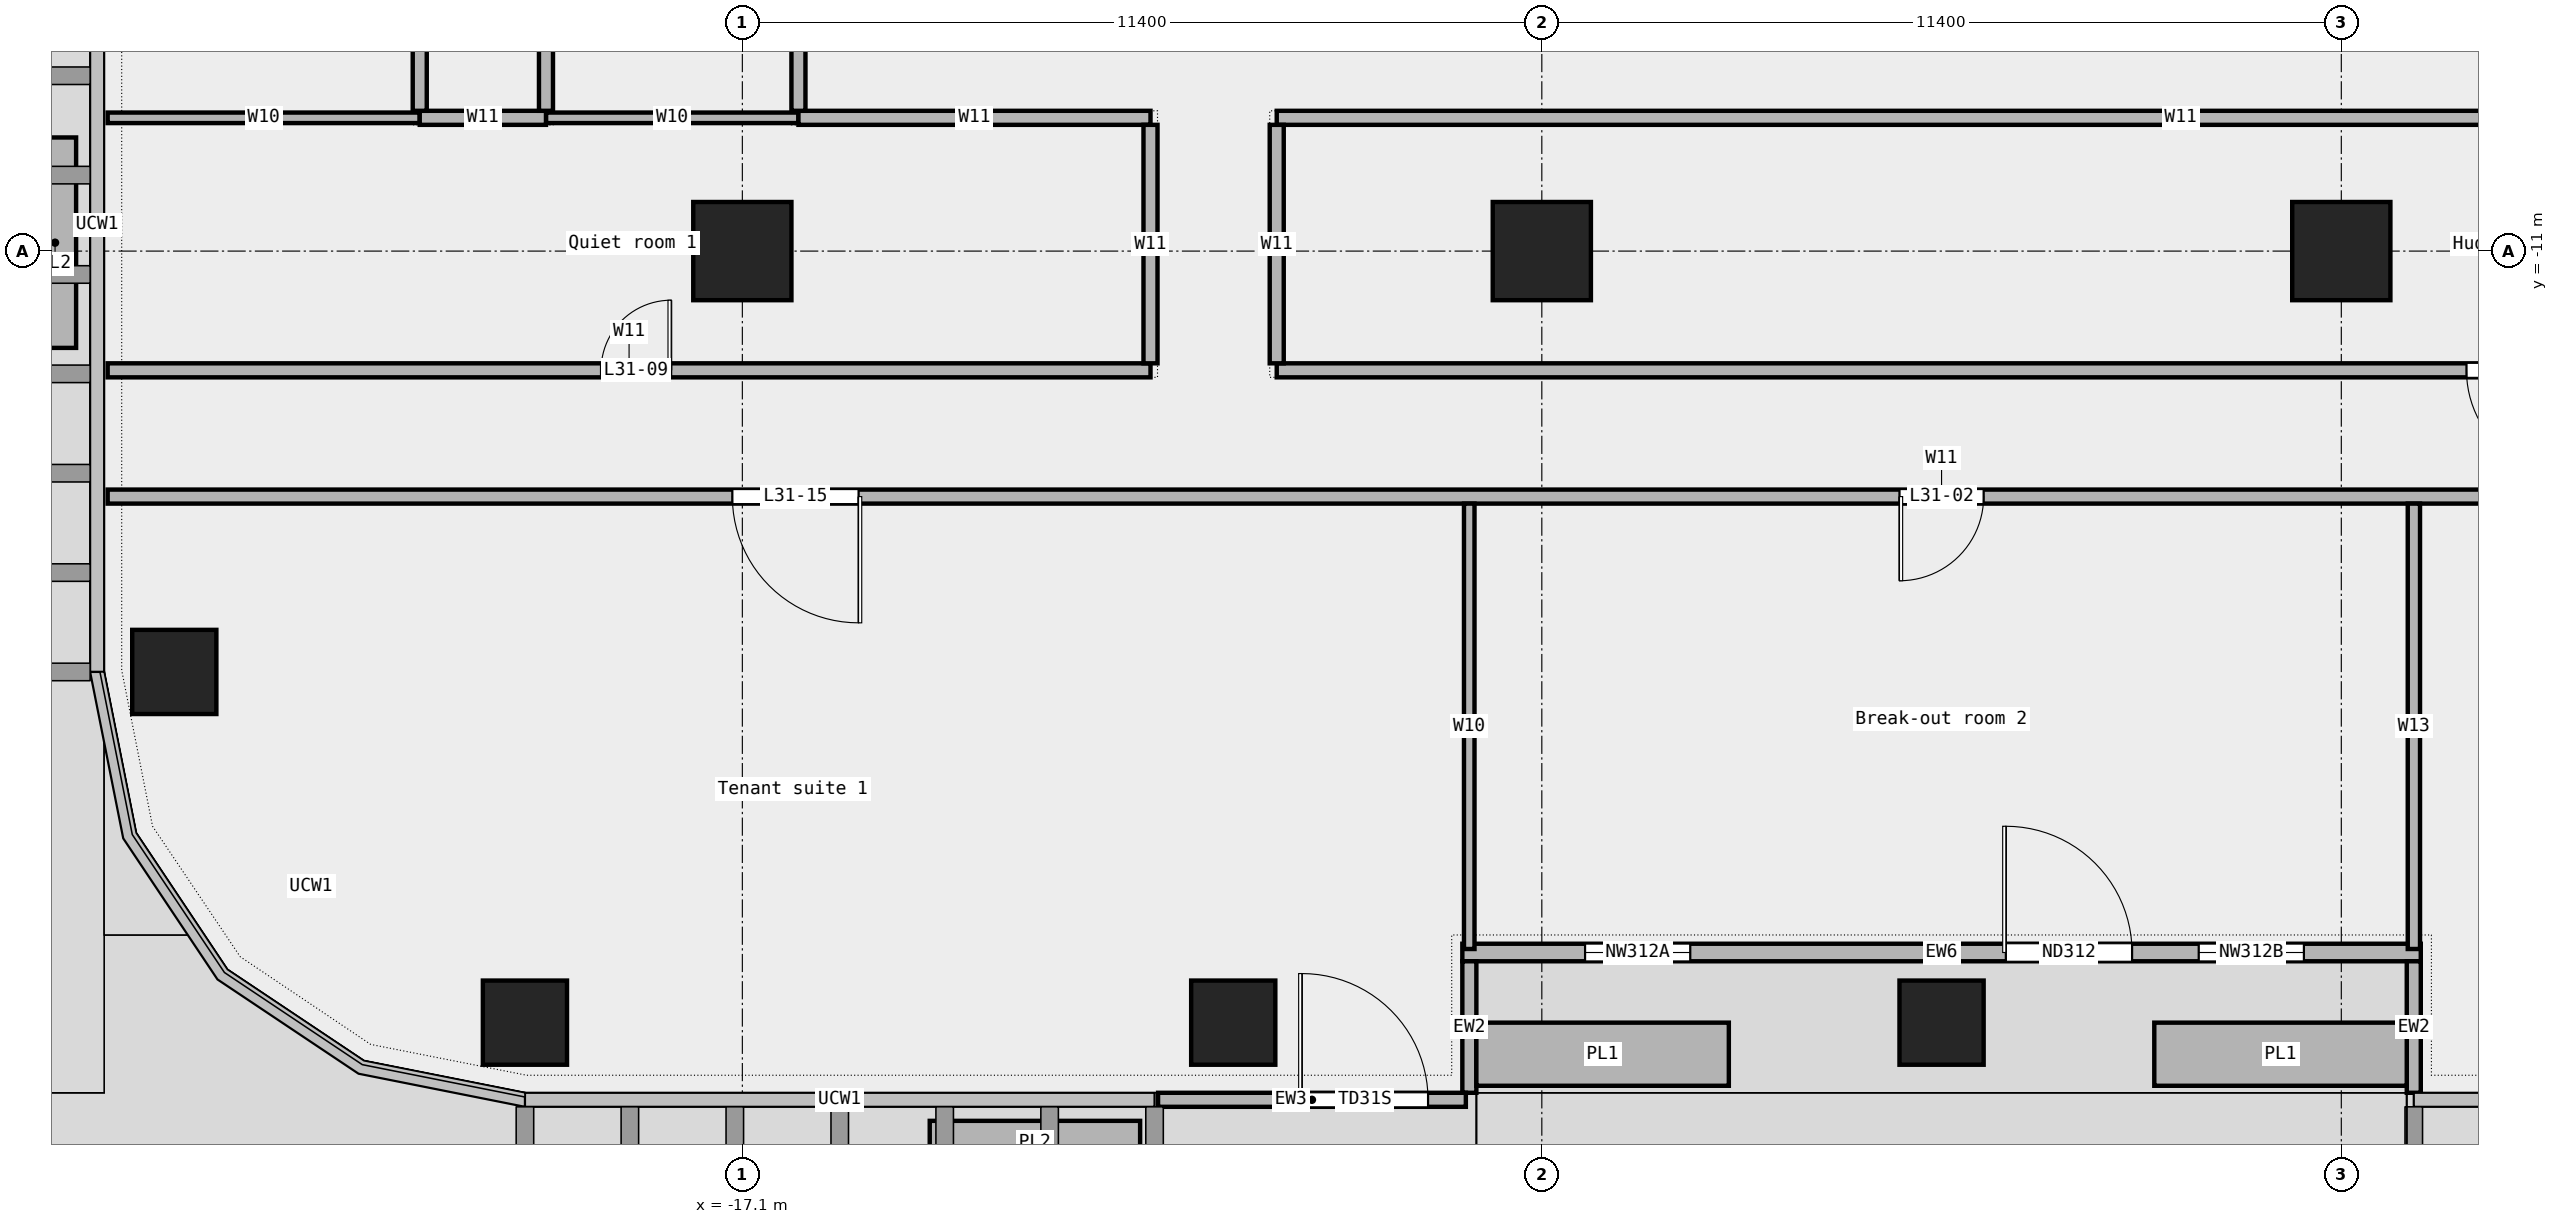
"""IFC4 building model, lengths in metres.
Left out: names, types, materials, properties, quantities, classifications, styles, units other than length and angle.
Written with IfcOpenShell. Run it as: python <this file> out.ifc"""

import sys

from ifc_helpers import new_model, si_unit, direction, frame, frame_2d, origin, origin_2d, place, context, subcontext, project, spatial, rectangle, extrude, element, fill, save


model = new_model("IFC4")
c1 = context("Model", 3, precision=1e-05, world=origin(), true_north=direction((0.0, 1.0)))
c2 = subcontext(c1, "Body", "Model", "MODEL_VIEW")
j1 = project(units=[si_unit("LENGTHUNIT", "METRE"), si_unit("PLANEANGLEUNIT", "RADIAN")], contexts=[c1])
p1 = place(None, origin())
s1 = spatial("IfcSite", under=j1, at=p1, CompositionType="ELEMENT")
p2 = place(p1, origin())
s2 = spatial("IfcBuilding", under=s1, at=p2, CompositionType="ELEMENT")
p3 = place(p2, frame((0.0, 0.0, 157.0)))
s3 = spatial("IfcBuildingStorey", under=s2, at=p3, CompositionType="ELEMENT", Elevation=157.0)
for number, where, z_axis, x_axis in (
    (1, (-20.2, -22.0, 0.0), (0.0, 0.0, 1.0), (1.0, 0.0, 0.0)),
    (2, (-10.1, -22.0, 0.0), (0.0, 0.0, 1.0), (1.0, 0.0, 0.0)),
    (3, (0.0, -22.0, 0.0), (0.0, 0.0, 1.0), (1.0, 0.0, 0.0)),
    (4, (-25.2, -17.0, 0.0), (0.0, 0.0, 1.0), (1.0, 0.0, 0.0)),
):
    element("IfcColumn", number, at=place(p3, frame(where, z_axis=z_axis, x_axis=x_axis)), inside=s3, PredefinedType="COLUMN", context=c2, shape_type="SweptSolid", body=[
        extrude(rectangle(XDim=1.2, YDim=1.2, at=origin_2d()), origin(), (0.0, 0.0, 1.0), 3.6),
    ])
for number, where, z_axis, x_axis in (
    (5, (-17.1, -11.0, 0.0), (0.0, 0.0, 1.0), (1.0, 0.0, 0.0)),
    (6, (-5.7, -11.0, 0.0), (0.0, 0.0, 1.0), (1.0, 0.0, 0.0)),
    (7, (5.7, -11.0, 0.0), (0.0, 0.0, 1.0), (1.0, 0.0, 0.0)),
):
    element("IfcColumn", number, at=place(p3, frame(where, z_axis=z_axis, x_axis=x_axis)), inside=s3, PredefinedType="COLUMN", context=c2, shape_type="SweptSolid", body=[
        extrude(rectangle(XDim=1.4, YDim=1.4, at=origin_2d()), origin(), (0.0, 0.0, 1.0), 3.6),
    ])
p4 = place(p3, frame((-6.833, -21.0, 0.0), z_axis=(0.0, 0.0, 1.0), x_axis=(1.0, 0.0, 0.0)))
e8 = element("IfcWall", 8, at=p4, inside=s3, PredefinedType="STANDARD", context=c2, shape_type="SweptSolid", body=[
    extrude(rectangle(XDim=13.667, YDim=0.25, at=frame_2d((6.833, 0.0))), origin(), (0.0, 0.0, 1.0), 3.6),
])
p5 = place(p4, frame((1.75, 0.0, 0.45)))
e9 = element("IfcOpeningElement", 9, at=p5, cuts=e8, PredefinedType="OPENING", context=c2, shape_type="SweptSolid", body=[
    extrude(rectangle(XDim=1.5, YDim=2.4, at=frame_2d((0.75, 1.2))), frame((0.0, 0.137, 0.0), z_axis=(0.0, -1.0, 0.0), x_axis=(1.0, 0.0, 0.0)), (0.0, 0.0, 1.0), 0.274),
])
p6 = place(p4, frame((7.75, 0.0, 0.0)))
e10 = element("IfcOpeningElement", 10, at=p6, cuts=e8, PredefinedType="OPENING", context=c2, shape_type="SweptSolid", body=[
    extrude(rectangle(XDim=1.8, YDim=2.4, at=frame_2d((0.9, 1.2))), frame((0.0, 0.137, 0.0), z_axis=(0.0, -1.0, 0.0), x_axis=(1.0, 0.0, 0.0)), (0.0, 0.0, 1.0), 0.274),
])
p7 = place(p4, frame((10.5, 0.0, 0.45)))
e11 = element("IfcOpeningElement", 11, at=p7, cuts=e8, PredefinedType="OPENING", context=c2, shape_type="SweptSolid", body=[
    extrude(rectangle(XDim=1.5, YDim=2.4, at=frame_2d((0.75, 1.2))), frame((0.0, 0.137, 0.0), z_axis=(0.0, -1.0, 0.0), x_axis=(1.0, 0.0, 0.0)), (0.0, 0.0, 1.0), 0.274),
])
for number, where, z_axis, x_axis in (
    (12, (-6.733, -23.0, 0.0), (0.0, 0.0, 1.0), (0.0, 1.0, 0.0)),
    (13, (6.733, -23.0, 0.0), (0.0, 0.0, 1.0), (0.0, 1.0, 0.0)),
):
    element("IfcWall", number, at=place(p3, frame(where, z_axis=z_axis, x_axis=x_axis)), inside=s3, PredefinedType="STANDARD", context=c2, shape_type="SweptSolid", body=[
        extrude(rectangle(XDim=1.875, YDim=0.2, at=frame_2d((0.938, 0.0))), origin(), (0.0, 0.0, 1.0), 3.6),
    ])
for number, where, z_axis, x_axis in (
    (14, (-6.633, -22.45, 0.0), (0.0, 0.0, 1.0), (1.0, 0.0, 0.0)),
    (15, (3.033, -22.45, 0.0), (0.0, 0.0, 1.0), (1.0, 0.0, 0.0)),
):
    element("IfcWall", number, at=place(p3, frame(where, z_axis=z_axis, x_axis=x_axis)), inside=s3, PredefinedType="STANDARD", context=c2, shape_type="SweptSolid", body=[
        extrude(rectangle(XDim=3.6, YDim=0.9, at=frame_2d((1.8, 0.0))), origin(), (0.0, 0.0, 1.0), 0.7),
    ])
p8 = place(p3, frame((-11.172, -23.1, 0.0), z_axis=(0.0, 0.0, 1.0), x_axis=(1.0, 0.0, 0.0)))
e16 = element("IfcWall", 16, at=p8, inside=s3, PredefinedType="STANDARD", context=c2, shape_type="SweptSolid", body=[
    extrude(rectangle(XDim=4.389, YDim=0.2, at=frame_2d((2.194, 0.0))), origin(), (0.0, 0.0, 1.0), 3.6),
])
p9 = place(p8, frame((2.05, 0.0, 0.0)))
e17 = element("IfcOpeningElement", 17, at=p9, cuts=e16, PredefinedType="OPENING", context=c2, shape_type="SweptSolid", body=[
    extrude(rectangle(XDim=1.8, YDim=2.4, at=frame_2d((0.9, 1.2))), frame((0.0, 0.112, 0.0), z_axis=(0.0, -1.0, 0.0), x_axis=(1.0, 0.0, 0.0)), (0.0, 0.0, 1.0), 0.224),
])
for number, where, z_axis, x_axis in (
    (18, (-14.428, -23.7, 0.0), (0.0, 0.0, 1.0), (1.0, 0.0, 0.0)),
    (19, (-26.9, -9.38, 0.0), (0.0, 0.0, 1.0), (0.0, -1.0, 0.0)),
):
    element("IfcWall", number, at=place(p3, frame(where, z_axis=z_axis, x_axis=x_axis)), inside=s3, PredefinedType="STANDARD", context=c2, shape_type="SweptSolid", body=[
        extrude(rectangle(XDim=3.0, YDim=0.6, at=frame_2d((1.5, 0.0))), origin(), (0.0, 0.0, 1.0), 0.7),
    ])
p10 = place(p3, frame((-26.15, -14.5, 0.0), z_axis=(0.0, 0.0, 1.0), x_axis=(1.0, 0.0, 0.0)))
e20 = element("IfcWall", 20, at=p10, inside=s3, PredefinedType="PARTITIONING", context=c2, shape_type="SweptSolid", body=[
    extrude(rectangle(XDim=52.3, YDim=0.2, at=frame_2d((26.15, 0.0))), origin(), (0.0, 0.0, 1.0), 3.6),
])
p11 = place(p10, frame((25.55, 0.0, 0.0)))
e21 = element("IfcOpeningElement", 21, at=p11, cuts=e20, PredefinedType="OPENING", context=c2, shape_type="SweptSolid", body=[
    extrude(rectangle(XDim=1.2, YDim=2.1, at=frame_2d((0.6, 1.05))), frame((0.0, 0.112, 0.0), z_axis=(0.0, -1.0, 0.0), x_axis=(1.0, 0.0, 0.0)), (0.0, 0.0, 1.0), 0.224),
])
p12 = place(p10, frame((8.907, 0.0, 0.0)))
e22 = element("IfcOpeningElement", 22, at=p12, cuts=e20, PredefinedType="OPENING", context=c2, shape_type="SweptSolid", body=[
    extrude(rectangle(XDim=1.8, YDim=2.1, at=frame_2d((0.9, 1.05))), frame((0.0, 0.112, 0.0), z_axis=(0.0, -1.0, 0.0), x_axis=(1.0, 0.0, 0.0)), (0.0, 0.0, 1.0), 0.224),
])
p13 = place(p10, frame((41.593, 0.0, 0.0)))
e23 = element("IfcOpeningElement", 23, at=p13, cuts=e20, PredefinedType="OPENING", context=c2, shape_type="SweptSolid", body=[
    extrude(rectangle(XDim=1.8, YDim=2.1, at=frame_2d((0.9, 1.05))), frame((0.0, 0.112, 0.0), z_axis=(0.0, -1.0, 0.0), x_axis=(1.0, 0.0, 0.0)), (0.0, 0.0, 1.0), 0.224),
])
p14 = place(p3, frame((-26.15, -12.7, 0.0), z_axis=(0.0, 0.0, 1.0), x_axis=(1.0, 0.0, 0.0)))
e24 = element("IfcWall", 24, at=p14, inside=s3, PredefinedType="PARTITIONING", context=c2, shape_type="SweptSolid", body=[
    extrude(rectangle(XDim=14.87, YDim=0.2, at=frame_2d((7.435, 0.0))), origin(), (0.0, 0.0, 1.0), 3.6),
])
p15 = place(p14, frame((7.035, 0.0, 0.0)))
e25 = element("IfcOpeningElement", 25, at=p15, cuts=e24, PredefinedType="OPENING", context=c2, shape_type="SweptSolid", body=[
    extrude(rectangle(XDim=1.0, YDim=2.1, at=frame_2d((0.5, 1.05))), frame((0.0, 0.112, 0.0), z_axis=(0.0, -1.0, 0.0), x_axis=(1.0, 0.0, 0.0)), (0.0, 0.0, 1.0), 0.224),
])
p16 = place(p3, frame((-9.48, -12.7, 0.0), z_axis=(0.0, 0.0, 1.0), x_axis=(1.0, 0.0, 0.0)))
e26 = element("IfcWall", 26, at=p16, inside=s3, PredefinedType="PARTITIONING", context=c2, shape_type="SweptSolid", body=[
    extrude(rectangle(XDim=35.63, YDim=0.2, at=frame_2d((17.815, 0.0))), origin(), (0.0, 0.0, 1.0), 3.6),
])
p17 = place(p16, frame((16.965, 0.0, 0.0)))
e27 = element("IfcOpeningElement", 27, at=p17, cuts=e26, PredefinedType="OPENING", context=c2, shape_type="SweptSolid", body=[
    extrude(rectangle(XDim=1.5, YDim=2.1, at=frame_2d((0.75, 1.05))), frame((0.0, 0.112, 0.0), z_axis=(0.0, -1.0, 0.0), x_axis=(1.0, 0.0, 0.0)), (0.0, 0.0, 1.0), 0.224),
])
p18 = place(p3, frame((-26.15, -9.1, 0.0), z_axis=(0.0, 0.0, 1.0), x_axis=(1.0, 0.0, 0.0)))
e28 = element("IfcWall", 28, at=p18, inside=s3, PredefinedType="PARTITIONING", context=c2, shape_type="SweptSolid", body=[
    extrude(rectangle(XDim=4.45, YDim=0.15, at=frame_2d((2.225, 0.0))), origin(), (0.0, 0.0, 1.0), 3.6),
])
p19 = place(p3, frame((-19.9, -9.1, 0.0), z_axis=(0.0, 0.0, 1.0), x_axis=(1.0, 0.0, 0.0)))
e29 = element("IfcWall", 29, at=p19, inside=s3, PredefinedType="PARTITIONING", context=c2, shape_type="SweptSolid", body=[
    extrude(rectangle(XDim=3.6, YDim=0.15, at=frame_2d((1.8, 0.0))), origin(), (0.0, 0.0, 1.0), 3.6),
])
p20 = place(p3, frame((-21.7, -9.1, 0.0), z_axis=(0.0, 0.0, 1.0), x_axis=(1.0, 0.0, 0.0)))
e30 = element("IfcWall", 30, at=p20, inside=s3, PredefinedType="PARTITIONING", context=c2, shape_type="SweptSolid", body=[
    extrude(rectangle(XDim=1.8, YDim=0.2, at=frame_2d((0.9, 0.0))), origin(), (0.0, 0.0, 1.0), 3.6),
])
p21 = place(p3, frame((-16.3, -9.1, 0.0), z_axis=(0.0, 0.0, 1.0), x_axis=(1.0, 0.0, 0.0)))
e31 = element("IfcWall", 31, at=p21, inside=s3, PredefinedType="PARTITIONING", context=c2, shape_type="SweptSolid", body=[
    extrude(rectangle(XDim=5.02, YDim=0.2, at=frame_2d((2.51, 0.0))), origin(), (0.0, 0.0, 1.0), 3.6),
])
p22 = place(p3, frame((-9.48, -9.1, 0.0), z_axis=(0.0, 0.0, 1.0), x_axis=(1.0, 0.0, 0.0)))
e32 = element("IfcWall", 32, at=p22, inside=s3, PredefinedType="PARTITIONING", context=c2, shape_type="SweptSolid", body=[
    extrude(rectangle(XDim=25.78, YDim=0.2, at=frame_2d((12.89, 0.0))), origin(), (0.0, 0.0, 1.0), 3.6),
])
p23 = place(p3, frame((-21.7, -9.0, 0.0), z_axis=(0.0, 0.0, 1.0), x_axis=(0.0, 1.0, 0.0)))
e33 = element("IfcWall", 33, at=p23, inside=s3, PredefinedType="PARTITIONING", context=c2, shape_type="SweptSolid", body=[
    extrude(rectangle(XDim=24.3, YDim=0.2, at=frame_2d((12.15, 0.0))), origin(), (0.0, 0.0, 1.0), 3.6),
])
p24 = place(p23, frame((14.925, 0.0, 0.0)))
e34 = element("IfcOpeningElement", 34, at=p24, cuts=e33, PredefinedType="OPENING", context=c2, shape_type="SweptSolid", body=[
    extrude(rectangle(XDim=0.9, YDim=2.1, at=frame_2d((0.45, 1.05))), frame((0.0, 0.112, 0.0), z_axis=(0.0, -1.0, 0.0), x_axis=(1.0, 0.0, 0.0)), (0.0, 0.0, 1.0), 0.224),
])
p25 = place(p23, frame((4.05, 0.0, 0.0)))
e35 = element("IfcOpeningElement", 35, at=p25, cuts=e33, PredefinedType="OPENING", context=c2, shape_type="SweptSolid", body=[
    extrude(rectangle(XDim=0.9, YDim=2.1, at=frame_2d((0.45, 1.05))), frame((0.0, 0.112, 0.0), z_axis=(0.0, -1.0, 0.0), x_axis=(1.0, 0.0, 0.0)), (0.0, 0.0, 1.0), 0.224),
])
p26 = place(p3, frame((-19.9, -9.0, 0.0), z_axis=(0.0, 0.0, 1.0), x_axis=(0.0, 1.0, 0.0)))
e36 = element("IfcWall", 36, at=p26, inside=s3, PredefinedType="PARTITIONING", context=c2, shape_type="SweptSolid", body=[
    extrude(rectangle(XDim=11.15, YDim=0.2, at=frame_2d((5.575, 0.0))), origin(), (0.0, 0.0, 1.0), 3.6),
])
p27 = place(p3, frame((-16.3, -9.0, 0.0), z_axis=(0.0, 0.0, 1.0), x_axis=(0.0, 1.0, 0.0)))
e37 = element("IfcWall", 37, at=p27, inside=s3, PredefinedType="PARTITIONING", context=c2, shape_type="SweptSolid", body=[
    extrude(rectangle(XDim=8.3, YDim=0.2, at=frame_2d((4.15, 0.0))), origin(), (0.0, 0.0, 1.0), 3.6),
])
p28 = place(p27, frame((6.823, 0.0, 0.0)))
e38 = element("IfcOpeningElement", 38, at=p28, cuts=e37, PredefinedType="OPENING", context=c2, shape_type="SweptSolid", body=[
    extrude(rectangle(XDim=0.9, YDim=2.1, at=frame_2d((0.45, 1.05))), frame((0.0, 0.112, 0.0), z_axis=(0.0, -1.0, 0.0), x_axis=(1.0, 0.0, 0.0)), (0.0, 0.0, 1.0), 0.224),
])
p29 = place(p27, frame((2.673, 0.0, 0.0)))
e39 = element("IfcOpeningElement", 39, at=p29, cuts=e37, PredefinedType="OPENING", context=c2, shape_type="SweptSolid", body=[
    extrude(rectangle(XDim=0.9, YDim=2.1, at=frame_2d((0.45, 1.05))), frame((0.0, 0.112, 0.0), z_axis=(0.0, -1.0, 0.0), x_axis=(1.0, 0.0, 0.0)), (0.0, 0.0, 1.0), 0.224),
])
for number, where, z_axis, x_axis in (
    (40, (-11.28, -12.6, 0.0), (0.0, 0.0, 1.0), (0.0, 1.0, 0.0)),
    (41, (-9.48, -12.6, 0.0), (0.0, 0.0, 1.0), (0.0, 1.0, 0.0)),
):
    element("IfcWall", number, at=place(p3, frame(where, z_axis=z_axis, x_axis=x_axis)), inside=s3, PredefinedType="PARTITIONING", context=c2, shape_type="SweptSolid", body=[
        extrude(rectangle(XDim=3.4, YDim=0.2, at=frame_2d((1.7, 0.0))), origin(), (0.0, 0.0, 1.0), 3.6),
    ])
p30 = place(p3, frame((-6.735, -20.95, 0.0), z_axis=(0.0, 0.0, 1.0), x_axis=(0.0, 1.0, 0.0)))
e42 = element("IfcWall", 42, at=p30, inside=s3, PredefinedType="PARTITIONING", context=c2, shape_type="SweptSolid", body=[
    extrude(rectangle(XDim=6.35, YDim=0.15, at=frame_2d((3.175, 0.0))), origin(), (0.0, 0.0, 1.0), 3.6),
])
p31 = place(p3, frame((6.735, -20.95, 0.0), z_axis=(0.0, 0.0, 1.0), x_axis=(0.0, 1.0, 0.0)))
e43 = element("IfcWall", 43, at=p31, inside=s3, PredefinedType="PARTITIONING", context=c2, shape_type="SweptSolid", body=[
    extrude(rectangle(XDim=6.35, YDim=0.175, at=frame_2d((3.175, 0.0))), origin(), (0.0, 0.0, 1.0), 3.6),
])
p32 = place(p5, origin())
e44 = element("IfcWindow", 44, at=p32, inside=s3, PartitioningType="SINGLE_PANEL", PredefinedType="WINDOW", context=c2, shape_type="SweptSolid", body=[
    extrude(rectangle(XDim=1.5, YDim=2.4, at=frame_2d((0.75, 1.2))), frame((0.0, 0.03, 0.0), z_axis=(0.0, -1.0, 0.0), x_axis=(1.0, 0.0, 0.0)), (0.0, 0.0, 1.0), 0.06),
])
fill(e9, e44)
p33 = place(p6, origin())
e45 = element("IfcDoor", 45, at=p33, inside=s3, OperationType="DOUBLE_DOOR_SINGLE_SWING", PredefinedType="DOOR", context=c2, shape_type="SweptSolid", body=[
    extrude(rectangle(XDim=1.8, YDim=2.4, at=frame_2d((0.9, 1.2))), frame((0.0, 0.025, 0.0), z_axis=(0.0, -1.0, 0.0), x_axis=(1.0, 0.0, 0.0)), (0.0, 0.0, 1.0), 0.05),
])
fill(e10, e45)
p34 = place(p7, origin())
e46 = element("IfcWindow", 46, at=p34, inside=s3, PartitioningType="SINGLE_PANEL", PredefinedType="WINDOW", context=c2, shape_type="SweptSolid", body=[
    extrude(rectangle(XDim=1.5, YDim=2.4, at=frame_2d((0.75, 1.2))), frame((0.0, 0.03, 0.0), z_axis=(0.0, -1.0, 0.0), x_axis=(1.0, 0.0, 0.0)), (0.0, 0.0, 1.0), 0.06),
])
fill(e11, e46)
p35 = place(p9, origin())
e47 = element("IfcDoor", 47, at=p35, inside=s3, OperationType="DOUBLE_DOOR_SINGLE_SWING", PredefinedType="DOOR", context=c2, shape_type="SweptSolid", body=[
    extrude(rectangle(XDim=1.8, YDim=2.4, at=frame_2d((0.9, 1.2))), frame((0.0, 0.025, 0.0), z_axis=(0.0, -1.0, 0.0), x_axis=(1.0, 0.0, 0.0)), (0.0, 0.0, 1.0), 0.05),
])
fill(e17, e47)
p36 = place(p11, origin())
e48 = element("IfcDoor", 48, at=p36, inside=s3, OperationType="SINGLE_SWING_RIGHT", PredefinedType="DOOR", context=c2, shape_type="SweptSolid", body=[
    extrude(rectangle(XDim=1.2, YDim=2.1, at=frame_2d((0.6, 1.05))), frame((0.0, 0.025, 0.0), z_axis=(0.0, -1.0, 0.0), x_axis=(1.0, 0.0, 0.0)), (0.0, 0.0, 1.0), 0.05),
])
fill(e21, e48)
p37 = place(p17, origin())
e49 = element("IfcDoor", 49, at=p37, inside=s3, OperationType="DOUBLE_DOOR_SINGLE_SWING", PredefinedType="DOOR", context=c2, shape_type="SweptSolid", body=[
    extrude(rectangle(XDim=1.5, YDim=2.1, at=frame_2d((0.75, 1.05))), frame((0.0, 0.025, 0.0), z_axis=(0.0, -1.0, 0.0), x_axis=(1.0, 0.0, 0.0)), (0.0, 0.0, 1.0), 0.05),
])
fill(e27, e49)
p38 = place(p15, origin())
e50 = element("IfcDoor", 50, at=p38, inside=s3, OperationType="SINGLE_SWING_RIGHT", PredefinedType="DOOR", context=c2, shape_type="SweptSolid", body=[
    extrude(rectangle(XDim=1.0, YDim=2.1, at=frame_2d((0.5, 1.05))), frame((0.0, 0.025, 0.0), z_axis=(0.0, -1.0, 0.0), x_axis=(1.0, 0.0, 0.0)), (0.0, 0.0, 1.0), 0.05),
])
fill(e25, e50)
p39 = place(p12, origin())
e51 = element("IfcDoor", 51, at=p39, inside=s3, OperationType="DOUBLE_DOOR_SINGLE_SWING", PredefinedType="DOOR", context=c2, shape_type="SweptSolid", body=[
    extrude(rectangle(XDim=1.8, YDim=2.1, at=frame_2d((0.9, 1.05))), frame((0.0, 0.025, 0.0), z_axis=(0.0, -1.0, 0.0), x_axis=(1.0, 0.0, 0.0)), (0.0, 0.0, 1.0), 0.05),
])
fill(e22, e51)
save(model, sys.argv[1])
